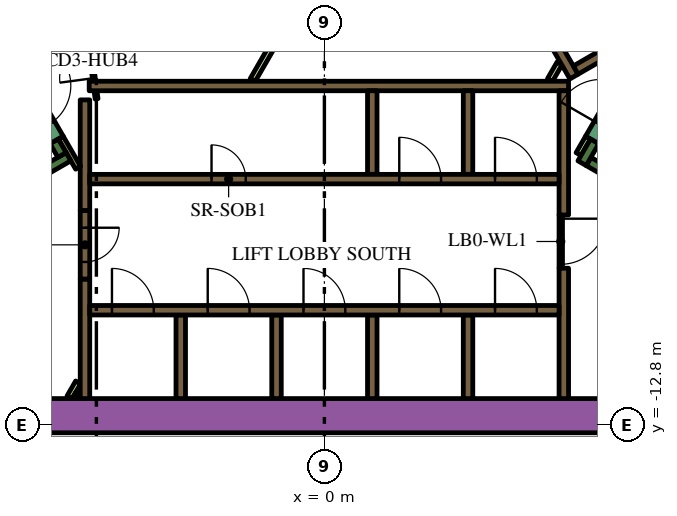
"""IFC4 building model, lengths in metres.
Left out: names, types, materials, properties, quantities, classifications, styles, units other than length and angle.
Written with IfcOpenShell. Run it as: python <this file> out.ifc"""

import sys

from ifc_helpers import new_model, si_unit, direction, frame, frame_2d, origin, place, context, subcontext, project, spatial, polyline, rectangle, outline, extrude, element, fill, save


model = new_model("IFC4")
c1 = context("Model", 3, precision=1e-05, world=origin(), true_north=direction((0.0, 1.0)))
c2 = subcontext(c1, "Body", "Model", "MODEL_VIEW")
j1 = project(units=[si_unit("LENGTHUNIT", "METRE"), si_unit("PLANEANGLEUNIT", "RADIAN")], contexts=[c1])
p1 = place(None, origin())
s1 = spatial("IfcSite", under=j1, at=p1, CompositionType="ELEMENT")
p2 = place(p1, origin())
s2 = spatial("IfcBuilding", under=s1, at=p2, CompositionType="ELEMENT")
p3 = place(p2, frame((0.0, 0.0, 126.6)))
s3 = spatial("IfcBuildingStorey", under=s2, at=p3, CompositionType="ELEMENT", Elevation=126.6)
p4 = place(p3, frame((6.776, 13.364, 0.0), z_axis=(0.0, 0.0, 1.0), x_axis=(0.500004177138, -0.8660229921, 0.0)))
e1 = element("IfcWall", 1, at=p4, inside=s3, PredefinedType="SOLIDWALL", context=c2, shape_type="SweptSolid", body=[
    extrude(rectangle(XDim=20.204, YDim=0.9, at=frame_2d((10.102, 0.0))), origin(), (0.0, 0.0, 1.0), 3.9),
])
p5 = place(p3, frame((-12.019, -12.55, 0.0), z_axis=(0.0, 0.0, 1.0), x_axis=(1.0, 0.0, 0.0)))
e2 = element("IfcWall", 2, at=p5, inside=s3, PredefinedType="SOLIDWALL", context=c2, shape_type="SweptSolid", body=[
    extrude(rectangle(XDim=21.63, YDim=0.9, at=frame_2d((10.815, 0.0))), origin(), (0.0, 0.0, 1.0), 3.9),
])
p6 = place(p3, frame((12.84, -9.261, 0.0), z_axis=(0.0, 0.0, 1.0), x_axis=(-0.866013990052, 0.500019768644, 0.0)))
e3 = element("IfcWall", 3, at=p6, inside=s3, PredefinedType="SOLIDWALL", context=c2, shape_type="SweptSolid", body=[
    extrude(rectangle(XDim=6.8, YDim=0.25, at=frame_2d((3.4, 0.0))), origin(), (0.0, 0.0, 1.0), 3.9),
])
p7 = place(p3, frame((7.113, -5.33, 0.0), z_axis=(0.0, 0.0, 1.0), x_axis=(-0.499965889992, -0.866045096311, 0.0)))
e4 = element("IfcWall", 4, at=p7, inside=s3, PredefinedType="SOLIDWALL", context=c2, shape_type="SweptSolid", body=[
    extrude(rectangle(XDim=0.666, YDim=0.25, at=frame_2d((0.333, 0.0))), origin(), (0.0, 0.0, 1.0), 3.9),
])
p8 = place(p3, frame((-12.84, -9.261, 0.0), z_axis=(0.0, 0.0, 1.0), x_axis=(0.866016039709, 0.500016218704, 0.0)))
e5 = element("IfcWall", 5, at=p8, inside=s3, PredefinedType="SOLIDWALL", context=c2, shape_type="SweptSolid", body=[
    extrude(rectangle(XDim=7.05, YDim=0.25, at=frame_2d((3.525, 0.0))), origin(), (0.0, 0.0, 1.0), 3.9),
])
p9 = place(p3, frame((-6.905, -5.69, 0.0), z_axis=(0.0, 0.0, 1.0), x_axis=(-0.499993700073, 0.866029041019, 0.0)))
e6 = element("IfcWall", 6, at=p9, inside=s3, PredefinedType="SOLIDWALL", context=c2, shape_type="SweptSolid", body=[
    extrude(rectangle(XDim=0.416, YDim=0.25, at=frame_2d((0.208, 0.0))), origin(), (0.0, 0.0, 1.0), 3.9),
])
p10 = place(p3, frame((-3.78, -12.1, 0.0), z_axis=(0.0, 0.0, 1.0), x_axis=(0.0, 1.0, 0.0)))
e7 = element("IfcWall", 7, at=p10, inside=s3, PredefinedType="SOLIDWALL", context=c2, shape_type="SweptSolid", body=[
    extrude(rectangle(XDim=2.2, YDim=0.25, at=frame_2d((1.1, 0.0))), origin(), (0.0, 0.0, 1.0), 3.9),
])
p11 = place(p3, frame((-6.3, -12.1, 0.0), z_axis=(0.0, 0.0, 1.0), x_axis=(0.0, 1.0, 0.0)))
e8 = element("IfcWall", 8, at=p11, inside=s3, PredefinedType="SOLIDWALL", context=c2, shape_type="SweptSolid", body=[
    extrude(rectangle(XDim=3.146, YDim=0.25, at=frame_2d((1.573, 0.0))), origin(), (0.0, 0.0, 1.0), 3.9),
])
p12 = place(p3, frame((-6.3, -4.24, 0.0), z_axis=(0.0, 0.0, 1.0), x_axis=(0.0, -1.0, 0.0)))
e9 = element("IfcWall", 9, at=p12, inside=s3, PredefinedType="SOLIDWALL", context=c2, shape_type="SweptSolid", body=[
    extrude(rectangle(XDim=2.914, YDim=0.25, at=frame_2d((1.457, 0.0))), origin(), (0.0, 0.0, 1.0), 3.9),
])
p13 = place(p3, frame((-6.19, -3.875, 0.0), z_axis=(0.0, 0.0, 1.0), x_axis=(1.0, 0.0, 0.0)))
e10 = element("IfcWall", 10, at=p13, inside=s3, PredefinedType="SOLIDWALL", context=c2, shape_type="SweptSolid", body=[
    extrude(rectangle(XDim=12.615, YDim=0.25, at=frame_2d((6.307, 0.0))), origin(), (0.0, 0.0, 1.0), 3.9),
])
p14 = place(p3, frame((6.3, -8.67, 0.0), z_axis=(0.0, 0.0, 1.0), x_axis=(0.0, -1.0, 0.0)))
e11 = element("IfcWall", 11, at=p14, inside=s3, PredefinedType="SOLIDWALL", context=c2, shape_type="SweptSolid", body=[
    extrude(rectangle(XDim=3.43, YDim=0.25, at=frame_2d((1.715, 0.0))), origin(), (0.0, 0.0, 1.0), 3.9),
])
p15 = place(p3, frame((6.3, -7.268, 0.0), z_axis=(0.0, 0.0, 1.0), x_axis=(0.0, 1.0, 0.0)))
e12 = element("IfcWall", 12, at=p15, inside=s3, PredefinedType="SOLIDWALL", context=c2, shape_type="SweptSolid", body=[
    extrude(rectangle(XDim=3.268, YDim=0.25, at=frame_2d((1.634, 0.0))), origin(), (0.0, 0.0, 1.0), 3.9),
])
for number, where, z_axis, x_axis in (
    (13, (3.78, -4.0, 0.0), (0.0, 0.0, 1.0), (0.0, -1.0, 0.0)),
    (14, (1.26, -4.0, 0.0), (0.0, 0.0, 1.0), (0.0, -1.0, 0.0)),
    (15, (3.78, -12.1, 0.0), (0.0, 0.0, 1.0), (0.0, 1.0, 0.0)),
    (16, (1.26, -12.1, 0.0), (0.0, 0.0, 1.0), (0.0, 1.0, 0.0)),
    (17, (-1.26, -12.1, 0.0), (0.0, 0.0, 1.0), (0.0, 1.0, 0.0)),
):
    element("IfcWall", number, at=place(p3, frame(where, z_axis=z_axis, x_axis=x_axis)), inside=s3, PredefinedType="SOLIDWALL", context=c2, shape_type="SweptSolid", body=[
        extrude(rectangle(XDim=2.2, YDim=0.25, at=frame_2d((1.1, 0.0))), origin(), (0.0, 0.0, 1.0), 3.9),
    ])
p16 = place(p3, origin())
e18 = element("IfcWall", 18, at=p16, inside=s3, PredefinedType="SOLIDWALL", context=c2, shape_type="SweptSolid", body=[
    extrude(outline(polyline([(0.335, 6.925), (0.335, 6.925), (0.335, 7.075), (0.335, 7.075), (0.335, 7.075), (0.245, 7.075), (0.079, 7.363), (0.035, 7.439), (0.252, 7.564), (0.377, 7.348), (6.552, -3.348), (6.677, -3.564), (6.46, -3.689), (4.897, -0.981), (0.332, 6.925), (0.335, 6.925), (0.335, 6.925)])), origin(), (0.0, 0.0, 1.0), 3.9),
])
p17 = place(p3, frame((9.352, -1.875, 0.0), z_axis=(0.0, 0.0, 1.0), x_axis=(-0.866024844342, -0.500000968981, 0.0)))
e19 = element("IfcWall", 19, at=p17, inside=s3, PredefinedType="SOLIDWALL", context=c2, shape_type="SweptSolid", body=[
    extrude(rectangle(XDim=3.162, YDim=0.25, at=frame_2d((1.581, 0.0))), origin(), (0.0, 0.0, 1.0), 3.9),
])
p18 = place(p3, frame((-6.708, -12.068, 0.0), z_axis=(0.0, 0.0, 1.0), x_axis=(0.500000789788, 0.8660249478, 0.0)))
e20 = element("IfcWall", 20, at=p18, inside=s3, PredefinedType="PARTITIONING", context=c2, shape_type="SweptSolid", body=[
    extrude(rectangle(XDim=0.456, YDim=0.15, at=frame_2d((0.228, 0.0))), origin(), (0.0, 0.0, 1.0), 2.75),
])
p19 = place(p3, frame((-6.534, -12.068, 0.0), z_axis=(0.0, 0.0, 1.0), x_axis=(0.500240224089, 0.865886665912, 0.0)))
e21 = element("IfcWall", 21, at=p19, inside=s3, PredefinedType="PARTITIONING", context=c2, shape_type="SweptSolid", body=[
    extrude(rectangle(XDim=0.109, YDim=0.15, at=frame_2d((0.054, 0.0))), origin(), (0.0, 0.0, 1.0), 2.75),
])
p20 = place(p3, frame((-6.48, -6.027, 0.0), z_axis=(0.0, 0.0, 1.0), x_axis=(-0.499936960004, 0.866061796884, 0.0)))
e22 = element("IfcWall", 22, at=p20, inside=s3, PredefinedType="PARTITIONING", context=c2, shape_type="SweptSolid", body=[
    extrude(rectangle(XDim=0.919, YDim=0.15, at=frame_2d((0.46, 0.0))), origin(), (0.0, 0.0, 1.0), 3.9),
])
p21 = place(p3, frame((-1.887, -3.718, 0.0), z_axis=(0.0, 0.0, 1.0), x_axis=(0.499842898591, 0.866116087328, 0.0)))
e23 = element("IfcWall", 23, at=p21, inside=s3, PredefinedType="PARTITIONING", context=c2, shape_type="SweptSolid", body=[
    extrude(rectangle(XDim=0.936, YDim=0.15, at=frame_2d((0.468, 0.0))), origin(), (0.0, 0.0, 1.0), 2.75),
])
p22 = place(p3, frame((6.688, -5.667, 0.0), z_axis=(0.0, 0.0, 1.0), x_axis=(0.499834152157, 0.86612113491, 0.0)))
e24 = element("IfcWall", 24, at=p22, inside=s3, PredefinedType="PARTITIONING", context=c2, shape_type="SweptSolid", body=[
    extrude(rectangle(XDim=0.505, YDim=0.15, at=frame_2d((0.252, 0.0))), origin(), (0.0, 0.0, 1.0), 2.75),
])
p23 = place(p3, frame((5.936, -3.718, 0.0), z_axis=(0.0, 0.0, 1.0), x_axis=(0.499890179513, 0.866088799389, 0.0)))
e25 = element("IfcWall", 25, at=p23, inside=s3, PredefinedType="PARTITIONING", context=c2, shape_type="SweptSolid", body=[
    extrude(rectangle(XDim=0.504, YDim=0.15, at=frame_2d((0.252, 0.0))), origin(), (0.0, 0.0, 1.0), 2.75),
])
p24 = place(p3, frame((-6.175, -9.775, 0.0), z_axis=(0.0, 0.0, 1.0), x_axis=(1.0, 0.0, 0.0)))
e26 = element("IfcWall", 26, at=p24, inside=s3, PredefinedType="SOLIDWALL", context=c2, shape_type="SweptSolid", body=[
    extrude(rectangle(XDim=12.35, YDim=0.25, at=frame_2d((6.175, 0.0))), origin(), (0.0, 0.0, 1.0), 3.9),
])
p25 = place(p24, frame((0.585, 0.0, 0.0)))
e27 = element("IfcOpeningElement", 27, at=p25, cuts=e26, PredefinedType="OPENING", context=c2, shape_type="SweptSolid", body=[
    extrude(rectangle(XDim=1.1, YDim=2.1, at=frame_2d((0.55, 1.05))), frame((0.0, 0.135, 0.0), z_axis=(0.0, -1.0, 0.0), x_axis=(1.0, 0.0, 0.0)), (0.0, 0.0, 1.0), 0.27),
])
p26 = place(p24, frame((3.105, 0.0, 0.0)))
e28 = element("IfcOpeningElement", 28, at=p26, cuts=e26, PredefinedType="OPENING", context=c2, shape_type="SweptSolid", body=[
    extrude(rectangle(XDim=1.1, YDim=2.1, at=frame_2d((0.55, 1.05))), frame((0.0, 0.135, 0.0), z_axis=(0.0, -1.0, 0.0), x_axis=(1.0, 0.0, 0.0)), (0.0, 0.0, 1.0), 0.27),
])
p27 = place(p24, frame((5.625, 0.0, 0.0)))
e29 = element("IfcOpeningElement", 29, at=p27, cuts=e26, PredefinedType="OPENING", context=c2, shape_type="SweptSolid", body=[
    extrude(rectangle(XDim=1.1, YDim=2.1, at=frame_2d((0.55, 1.05))), frame((0.0, 0.135, 0.0), z_axis=(0.0, -1.0, 0.0), x_axis=(1.0, 0.0, 0.0)), (0.0, 0.0, 1.0), 0.27),
])
p28 = place(p24, frame((8.145, 0.0, 0.0)))
e30 = element("IfcOpeningElement", 30, at=p28, cuts=e26, PredefinedType="OPENING", context=c2, shape_type="SweptSolid", body=[
    extrude(rectangle(XDim=1.1, YDim=2.1, at=frame_2d((0.55, 1.05))), frame((0.0, 0.135, 0.0), z_axis=(0.0, -1.0, 0.0), x_axis=(1.0, 0.0, 0.0)), (0.0, 0.0, 1.0), 0.27),
])
p29 = place(p24, frame((10.665, 0.0, 0.0)))
e31 = element("IfcOpeningElement", 31, at=p29, cuts=e26, PredefinedType="OPENING", context=c2, shape_type="SweptSolid", body=[
    extrude(rectangle(XDim=1.1, YDim=2.1, at=frame_2d((0.55, 1.05))), frame((0.0, 0.135, 0.0), z_axis=(0.0, -1.0, 0.0), x_axis=(1.0, 0.0, 0.0)), (0.0, 0.0, 1.0), 0.27),
])
p30 = place(p3, frame((-6.175, -6.325, 0.0), z_axis=(0.0, 0.0, 1.0), x_axis=(1.0, 0.0, 0.0)))
e32 = element("IfcWall", 32, at=p30, inside=s3, PredefinedType="SOLIDWALL", context=c2, shape_type="SweptSolid", body=[
    extrude(rectangle(XDim=12.35, YDim=0.25, at=frame_2d((6.175, 0.0))), origin(), (0.0, 0.0, 1.0), 3.9),
])
p31 = place(p30, frame((3.205, 0.0, 0.0)))
e33 = element("IfcOpeningElement", 33, at=p31, cuts=e32, PredefinedType="OPENING", context=c2, shape_type="SweptSolid", body=[
    extrude(rectangle(XDim=0.9, YDim=2.1, at=frame_2d((0.45, 1.05))), frame((0.0, 0.135, 0.0), z_axis=(0.0, -1.0, 0.0), x_axis=(1.0, 0.0, 0.0)), (0.0, 0.0, 1.0), 0.27),
])
p32 = place(p30, frame((8.145, 0.0, 0.0)))
e34 = element("IfcOpeningElement", 34, at=p32, cuts=e32, PredefinedType="OPENING", context=c2, shape_type="SweptSolid", body=[
    extrude(rectangle(XDim=1.1, YDim=2.1, at=frame_2d((0.55, 1.05))), frame((0.0, 0.135, 0.0), z_axis=(0.0, -1.0, 0.0), x_axis=(1.0, 0.0, 0.0)), (0.0, 0.0, 1.0), 0.27),
])
p33 = place(p30, frame((10.665, 0.0, 0.0)))
e35 = element("IfcOpeningElement", 35, at=p33, cuts=e32, PredefinedType="OPENING", context=c2, shape_type="SweptSolid", body=[
    extrude(rectangle(XDim=1.1, YDim=2.1, at=frame_2d((0.55, 1.05))), frame((0.0, 0.135, 0.0), z_axis=(0.0, -1.0, 0.0), x_axis=(1.0, 0.0, 0.0)), (0.0, 0.0, 1.0), 0.27),
])
p34 = place(p3, frame((7.048, -5.292, 0.0), z_axis=(0.0, 0.0, 1.0), x_axis=(0.49994051562, 0.866059744384, 0.0)))
e36 = element("IfcWall", 36, at=p34, inside=s3, PredefinedType="SOLIDWALL", context=c2, shape_type="SweptSolid", body=[
    extrude(rectangle(XDim=2.1, YDim=0.4, at=frame_2d((1.05, 0.0))), origin(), (0.0, 0.0, 1.0), 3.9),
])
p35 = place(p34, frame((0.45, 0.0, 0.0)))
e37 = element("IfcOpeningElement", 37, at=p35, cuts=e36, PredefinedType="OPENING", context=c2, shape_type="SweptSolid", body=[
    extrude(rectangle(XDim=1.2, YDim=2.1, at=frame_2d((0.6, 1.05))), frame((0.0, 0.21, 0.0), z_axis=(0.0, -1.0, 0.0), x_axis=(1.0, 0.0, 0.0)), (0.0, 0.0, 1.0), 0.42),
])
p36 = place(p3, frame((-8.098, -3.474, 0.0), z_axis=(0.0, 0.0, 1.0), x_axis=(0.49994051562, -0.866059744384, 0.0)))
e38 = element("IfcWall", 38, at=p36, inside=s3, PredefinedType="SOLIDWALL", context=c2, shape_type="SweptSolid", body=[
    extrude(rectangle(XDim=2.1, YDim=0.4, at=frame_2d((1.05, 0.0))), origin(), (0.0, 0.0, 1.0), 3.9),
])
p37 = place(p36, frame((0.45, 0.0, 0.0)))
e39 = element("IfcOpeningElement", 39, at=p37, cuts=e38, PredefinedType="OPENING", context=c2, shape_type="SweptSolid", body=[
    extrude(rectangle(XDim=1.2, YDim=2.1, at=frame_2d((0.6, 1.05))), frame((0.0, 0.21, 0.0), z_axis=(0.0, -1.0, 0.0), x_axis=(1.0, 0.0, 0.0)), (0.0, 0.0, 1.0), 0.42),
])
p38 = place(p3, frame((-6.3, -7.154, 0.0), z_axis=(0.0, 0.0, 1.0), x_axis=(0.0, -1.0, 0.0)))
e40 = element("IfcWall", 40, at=p38, inside=s3, PredefinedType="SOLIDWALL", context=c2, shape_type="SweptSolid", body=[
    extrude(rectangle(XDim=1.8, YDim=0.25, at=frame_2d((0.9, 0.0))), origin(), (0.0, 0.0, 1.0), 3.9),
])
p39 = place(p38, frame((0.45, 0.0, 0.0)))
e41 = element("IfcOpeningElement", 41, at=p39, cuts=e40, PredefinedType="OPENING", context=c2, shape_type="SweptSolid", body=[
    extrude(rectangle(XDim=0.9, YDim=2.1, at=frame_2d((0.45, 1.05))), frame((0.0, 0.135, 0.0), z_axis=(0.0, -1.0, 0.0), x_axis=(1.0, 0.0, 0.0)), (0.0, 0.0, 1.0), 0.27),
])
p40 = place(p3, frame((-5.995, -4.213, 0.0), z_axis=(0.0, 0.0, 1.0), x_axis=(-0.132072335448, 0.991240081014, 0.0)))
e42 = element("IfcWall", 42, at=p40, inside=s3, PredefinedType="PARTITIONING", context=c2, shape_type="SweptSolid", body=[
    extrude(rectangle(XDim=2.1, YDim=0.076, at=frame_2d((1.05, 0.0))), origin(), (0.0, 0.0, 1.0), 2.75),
])
p41 = place(p40, frame((0.55, 0.0, 0.0)))
e43 = element("IfcOpeningElement", 43, at=p41, cuts=e42, PredefinedType="OPENING", context=c2, shape_type="SweptSolid", body=[
    extrude(rectangle(XDim=0.9, YDim=2.1, at=frame_2d((0.45, 1.05))), frame((0.0, 0.048, 0.0), z_axis=(0.0, -1.0, 0.0), x_axis=(1.0, 0.0, 0.0)), (0.0, 0.0, 1.0), 0.096),
])
p42 = place(p3, frame((6.22, -7.266, 0.0), z_axis=(0.0, 0.0, 1.0), x_axis=(0.0, -1.0, 0.0)))
e44 = element("IfcWall", 44, at=p42, inside=s3, PredefinedType="PARTITIONING", context=c2, shape_type="SweptSolid", body=[
    extrude(rectangle(XDim=1.4, YDim=0.09, at=frame_2d((0.7, 0.0))), origin(), (0.0, 0.0, 1.0), 2.75),
])
p43 = place(p42, frame((0.1, 0.0, 0.0)))
e45 = element("IfcOpeningElement", 45, at=p43, cuts=e44, PredefinedType="OPENING", context=c2, shape_type="SweptSolid", body=[
    extrude(rectangle(XDim=1.2, YDim=2.1, at=frame_2d((0.6, 1.05))), frame((0.0, 0.055, 0.0), z_axis=(0.0, -1.0, 0.0), x_axis=(1.0, 0.0, 0.0)), (0.0, 0.0, 1.0), 0.11),
])
p44 = place(p3, frame((6.163, 18.475, 0.0), z_axis=(0.0, 0.0, 1.0), x_axis=(0.500001317485, -0.866024643133, 0.0)))
e46 = element("IfcWall", 46, at=p44, inside=s3, PredefinedType="PARTITIONING", context=c2, shape_type="SweptSolid", body=[
    extrude(rectangle(XDim=25.767, YDim=0.15, at=frame_2d((12.883, 0.0))), origin(), (0.0, 0.0, 1.0), 2.75),
])
p45 = place(p44, frame((19.306, 0.0, 0.0)))
e47 = element("IfcOpeningElement", 47, at=p45, cuts=e46, PredefinedType="OPENING", context=c2, shape_type="SweptSolid", body=[
    extrude(rectangle(XDim=1.0, YDim=2.1, at=frame_2d((0.5, 1.05))), frame((0.0, 0.085, 0.0), z_axis=(0.0, -1.0, 0.0), x_axis=(1.0, 0.0, 0.0)), (0.0, 0.0, 1.0), 0.17),
])
p46 = place(p44, frame((17.999, 0.0, 0.0)))
e48 = element("IfcOpeningElement", 48, at=p46, cuts=e46, PredefinedType="OPENING", context=c2, shape_type="SweptSolid", body=[
    extrude(rectangle(XDim=1.0, YDim=2.1, at=frame_2d((0.5, 1.05))), frame((0.0, 0.085, 0.0), z_axis=(0.0, -1.0, 0.0), x_axis=(1.0, 0.0, 0.0)), (0.0, 0.0, 1.0), 0.17),
])
p47 = place(p44, frame((0.596, 0.0, 0.0)))
e49 = element("IfcOpeningElement", 49, at=p47, cuts=e46, PredefinedType="OPENING", context=c2, shape_type="SweptSolid", body=[
    extrude(rectangle(XDim=1.0, YDim=2.1, at=frame_2d((0.5, 1.05))), frame((0.0, 0.085, 0.0), z_axis=(0.0, -1.0, 0.0), x_axis=(1.0, 0.0, 0.0)), (0.0, 0.0, 1.0), 0.17),
])
p48 = place(p3, frame((-19.081, -3.9, 0.0), z_axis=(0.0, 0.0, 1.0), x_axis=(0.499998313975, 0.866026377209, 0.0)))
e50 = element("IfcWall", 50, at=p48, inside=s3, PredefinedType="PARTITIONING", context=c2, shape_type="SweptSolid", body=[
    extrude(rectangle(XDim=25.766, YDim=0.15, at=frame_2d((12.883, 0.0))), origin(), (0.0, 0.0, 1.0), 2.75),
])
p49 = place(p48, frame((19.306, 0.0, 0.0)))
e51 = element("IfcOpeningElement", 51, at=p49, cuts=e50, PredefinedType="OPENING", context=c2, shape_type="SweptSolid", body=[
    extrude(rectangle(XDim=1.0, YDim=2.1, at=frame_2d((0.5, 1.05))), frame((0.0, 0.085, 0.0), z_axis=(0.0, -1.0, 0.0), x_axis=(1.0, 0.0, 0.0)), (0.0, 0.0, 1.0), 0.17),
])
p50 = place(p48, frame((18.0, 0.0, 0.0)))
e52 = element("IfcOpeningElement", 52, at=p50, cuts=e50, PredefinedType="OPENING", context=c2, shape_type="SweptSolid", body=[
    extrude(rectangle(XDim=1.0, YDim=2.1, at=frame_2d((0.5, 1.05))), frame((0.0, 0.085, 0.0), z_axis=(0.0, -1.0, 0.0), x_axis=(1.0, 0.0, 0.0)), (0.0, 0.0, 1.0), 0.17),
])
p51 = place(p48, frame((7.793, 0.0, 0.0)))
e53 = element("IfcOpeningElement", 53, at=p51, cuts=e50, PredefinedType="OPENING", context=c2, shape_type="SweptSolid", body=[
    extrude(rectangle(XDim=0.9, YDim=2.1, at=frame_2d((0.45, 1.05))), frame((0.0, 0.085, 0.0), z_axis=(0.0, -1.0, 0.0), x_axis=(1.0, 0.0, 0.0)), (0.0, 0.0, 1.0), 0.17),
])
p52 = place(p48, frame((4.674, 0.0, 0.0)))
e54 = element("IfcOpeningElement", 54, at=p52, cuts=e50, PredefinedType="OPENING", context=c2, shape_type="SweptSolid", body=[
    extrude(rectangle(XDim=0.9, YDim=2.1, at=frame_2d((0.45, 1.05))), frame((0.0, 0.085, 0.0), z_axis=(0.0, -1.0, 0.0), x_axis=(1.0, 0.0, 0.0)), (0.0, 0.0, 1.0), 0.17),
])
p53 = place(p48, frame((0.18, 0.0, 0.0)))
e55 = element("IfcOpeningElement", 55, at=p53, cuts=e50, PredefinedType="OPENING", context=c2, shape_type="SweptSolid", body=[
    extrude(rectangle(XDim=1.0, YDim=2.1, at=frame_2d((0.5, 1.05))), frame((0.0, 0.085, 0.0), z_axis=(0.0, -1.0, 0.0), x_axis=(1.0, 0.0, 0.0)), (0.0, 0.0, 1.0), 0.17),
])
p54 = place(p25, origin())
e56 = element("IfcDoor", 56, at=p54, inside=s3, OperationType="DOUBLE_DOOR_SLIDING", PredefinedType="DOOR", context=c2, shape_type="SweptSolid", body=[
    extrude(rectangle(XDim=1.1, YDim=2.1, at=frame_2d((0.55, 1.05))), frame((0.0, 0.025, 0.0), z_axis=(0.0, -1.0, 0.0), x_axis=(1.0, 0.0, 0.0)), (0.0, 0.0, 1.0), 0.05),
])
fill(e27, e56)
p55 = place(p26, origin())
e57 = element("IfcDoor", 57, at=p55, inside=s3, OperationType="DOUBLE_DOOR_SLIDING", PredefinedType="DOOR", context=c2, shape_type="SweptSolid", body=[
    extrude(rectangle(XDim=1.1, YDim=2.1, at=frame_2d((0.55, 1.05))), frame((0.0, 0.025, 0.0), z_axis=(0.0, -1.0, 0.0), x_axis=(1.0, 0.0, 0.0)), (0.0, 0.0, 1.0), 0.05),
])
fill(e28, e57)
p56 = place(p27, origin())
e58 = element("IfcDoor", 58, at=p56, inside=s3, OperationType="DOUBLE_DOOR_SLIDING", PredefinedType="DOOR", context=c2, shape_type="SweptSolid", body=[
    extrude(rectangle(XDim=1.1, YDim=2.1, at=frame_2d((0.55, 1.05))), frame((0.0, 0.025, 0.0), z_axis=(0.0, -1.0, 0.0), x_axis=(1.0, 0.0, 0.0)), (0.0, 0.0, 1.0), 0.05),
])
fill(e29, e58)
p57 = place(p28, origin())
e59 = element("IfcDoor", 59, at=p57, inside=s3, OperationType="DOUBLE_DOOR_SLIDING", PredefinedType="DOOR", context=c2, shape_type="SweptSolid", body=[
    extrude(rectangle(XDim=1.1, YDim=2.1, at=frame_2d((0.55, 1.05))), frame((0.0, 0.025, 0.0), z_axis=(0.0, -1.0, 0.0), x_axis=(1.0, 0.0, 0.0)), (0.0, 0.0, 1.0), 0.05),
])
fill(e30, e59)
p58 = place(p29, origin())
e60 = element("IfcDoor", 60, at=p58, inside=s3, OperationType="DOUBLE_DOOR_SLIDING", PredefinedType="DOOR", context=c2, shape_type="SweptSolid", body=[
    extrude(rectangle(XDim=1.1, YDim=2.1, at=frame_2d((0.55, 1.05))), frame((0.0, 0.025, 0.0), z_axis=(0.0, -1.0, 0.0), x_axis=(1.0, 0.0, 0.0)), (0.0, 0.0, 1.0), 0.05),
])
fill(e31, e60)
p59 = place(p31, origin())
e61 = element("IfcDoor", 61, at=p59, inside=s3, OperationType="SINGLE_SWING_LEFT", PredefinedType="DOOR", context=c2, shape_type="SweptSolid", body=[
    extrude(rectangle(XDim=0.9, YDim=2.1, at=frame_2d((0.45, 1.05))), frame((0.0, 0.025, 0.0), z_axis=(0.0, -1.0, 0.0), x_axis=(1.0, 0.0, 0.0)), (0.0, 0.0, 1.0), 0.05),
])
fill(e33, e61)
p60 = place(p32, origin())
e62 = element("IfcDoor", 62, at=p60, inside=s3, OperationType="DOUBLE_DOOR_SLIDING", PredefinedType="DOOR", context=c2, shape_type="SweptSolid", body=[
    extrude(rectangle(XDim=1.1, YDim=2.1, at=frame_2d((0.55, 1.05))), frame((0.0, 0.025, 0.0), z_axis=(0.0, -1.0, 0.0), x_axis=(1.0, 0.0, 0.0)), (0.0, 0.0, 1.0), 0.05),
])
fill(e34, e62)
p61 = place(p33, origin())
e63 = element("IfcDoor", 63, at=p61, inside=s3, OperationType="DOUBLE_DOOR_SLIDING", PredefinedType="DOOR", context=c2, shape_type="SweptSolid", body=[
    extrude(rectangle(XDim=1.1, YDim=2.1, at=frame_2d((0.55, 1.05))), frame((0.0, 0.025, 0.0), z_axis=(0.0, -1.0, 0.0), x_axis=(1.0, 0.0, 0.0)), (0.0, 0.0, 1.0), 0.05),
])
fill(e35, e63)
p62 = place(p39, origin())
e64 = element("IfcDoor", 64, at=p62, inside=s3, OperationType="SINGLE_SWING_LEFT", PredefinedType="DOOR", context=c2, shape_type="SweptSolid", body=[
    extrude(rectangle(XDim=0.9, YDim=2.1, at=frame_2d((0.45, 1.05))), frame((0.0, 0.025, 0.0), z_axis=(0.0, -1.0, 0.0), x_axis=(1.0, 0.0, 0.0)), (0.0, 0.0, 1.0), 0.05),
])
fill(e41, e64)
p63 = place(p41, origin())
e65 = element("IfcDoor", 65, at=p63, inside=s3, OperationType="SINGLE_SWING_LEFT", PredefinedType="DOOR", context=c2, shape_type="SweptSolid", body=[
    extrude(rectangle(XDim=0.9, YDim=2.1, at=frame_2d((0.45, 1.05))), frame((0.0, 0.025, 0.0), z_axis=(0.0, -1.0, 0.0), x_axis=(1.0, 0.0, 0.0)), (0.0, 0.0, 1.0), 0.05),
])
fill(e43, e65)
p64 = place(p43, origin())
e66 = element("IfcDoor", 66, at=p64, inside=s3, OperationType="SINGLE_SWING_LEFT", PredefinedType="DOOR", context=c2, shape_type="SweptSolid", body=[
    extrude(rectangle(XDim=1.2, YDim=2.1, at=frame_2d((0.6, 1.05))), frame((0.0, 0.025, 0.0), z_axis=(0.0, -1.0, 0.0), x_axis=(1.0, 0.0, 0.0)), (0.0, 0.0, 1.0), 0.05),
])
fill(e45, e66)
save(model, sys.argv[1])
